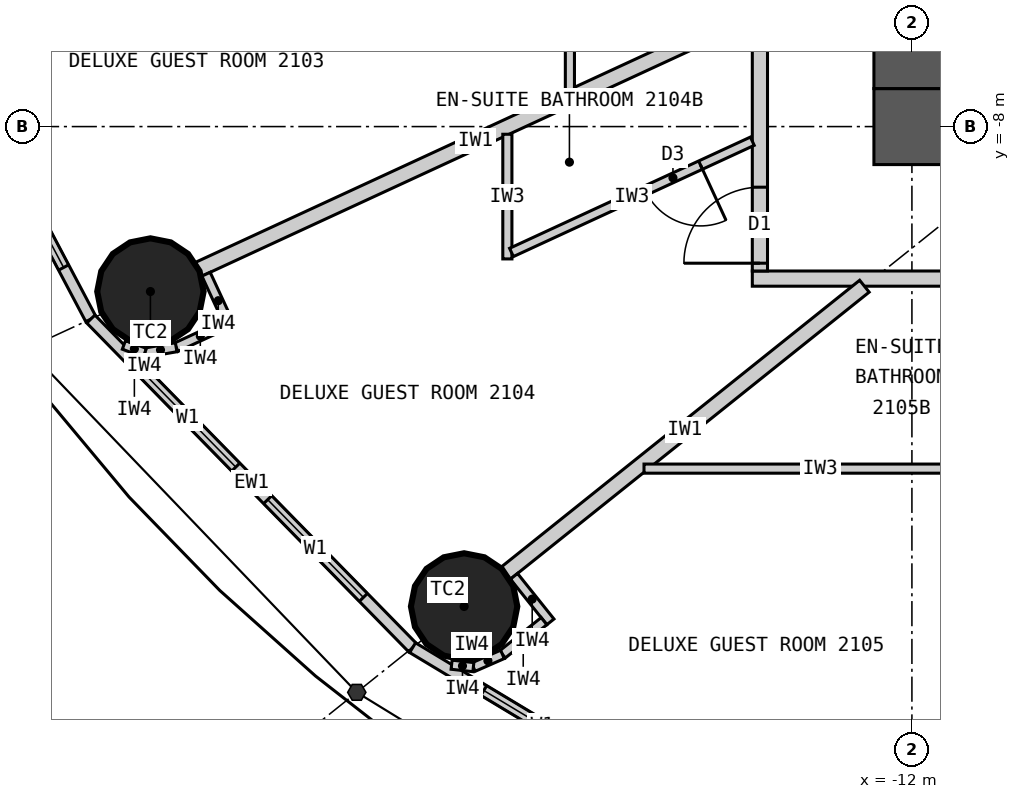
"""IFC4 building model, lengths in metres.
Left out: names, types, materials, properties, quantities, classifications, styles, units other than length and angle.
Written with IfcOpenShell. Run it as: python <this file> out.ifc"""

import sys

from ifc_helpers import new_model, si_unit, direction, frame, frame_2d, origin, origin_2d, place, context, subcontext, project, spatial, rectangle, circle, extrude, element, fill, save


model = new_model("IFC4")
c1 = context("Model", 3, precision=1e-05, world=origin(), true_north=direction((0.0, 1.0)))
c2 = subcontext(c1, "Body", "Model", "MODEL_VIEW")
j1 = project(units=[si_unit("LENGTHUNIT", "METRE"), si_unit("PLANEANGLEUNIT", "RADIAN")], contexts=[c1])
p1 = place(None, origin())
s1 = spatial("IfcSite", under=j1, at=p1, CompositionType="ELEMENT")
p2 = place(p1, origin())
s2 = spatial("IfcBuilding", under=s1, at=p2, CompositionType="ELEMENT")
p3 = place(p2, frame((0.0, 0.0, 83.7)))
s3 = spatial("IfcBuildingStorey", under=s2, at=p3, CompositionType="ELEMENT", Elevation=83.7)
for number, where, z_axis, x_axis in (
    (1, (-22.019, -10.17, 0.0), (0.0, 0.0, 1.0), (1.0, 0.0, 0.0)),
    (2, (-17.892, -14.313, 0.0), (0.0, 0.0, 1.0), (1.0, 0.0, 0.0)),
):
    element("IfcColumn", number, at=place(p3, frame(where, z_axis=z_axis, x_axis=x_axis)), inside=s3, PredefinedType="COLUMN", context=c2, shape_type="SweptSolid", body=[
        extrude(circle(Radius=0.7, at=origin_2d()), origin(), (0.0, 0.0, 1.0), 3.3),
    ])
p4 = place(p3, frame((12.5, -8.0, 0.0), z_axis=(0.0, 0.0, 1.0), x_axis=(-1.0, 0.0, 0.0)))
e3 = element("IfcWall", 3, at=p4, inside=s3, PredefinedType="SHEAR", context=c2, shape_type="SweptSolid", body=[
    extrude(rectangle(XDim=25.0, YDim=1.0, at=frame_2d((12.5, 0.0))), origin(), (0.0, 0.0, 1.0), 3.3),
])
p5 = place(p4, frame((11.2, 0.0, 0.0)))
e4 = element("IfcOpeningElement", 4, at=p5, cuts=e3, PredefinedType="OPENING", context=c2, shape_type="SweptSolid", body=[
    extrude(rectangle(XDim=1.2, YDim=2.2, at=frame_2d((0.6, 1.1))), frame((0.0, 0.51, 0.0), z_axis=(0.0, -1.0, 0.0), x_axis=(1.0, 0.0, 0.0)), (0.0, 0.0, 1.0), 1.02),
])
p6 = place(p4, frame((18.8, 0.0, 0.0)))
e5 = element("IfcOpeningElement", 5, at=p6, cuts=e3, PredefinedType="OPENING", context=c2, shape_type="SweptSolid", body=[
    extrude(rectangle(XDim=0.9, YDim=2.2, at=frame_2d((0.45, 1.1))), frame((0.0, 0.51, 0.0), z_axis=(0.0, -1.0, 0.0), x_axis=(1.0, 0.0, 0.0)), (0.0, 0.0, 1.0), 1.02),
])
p7 = place(p3, frame((-12.0, 7.5, 0.0), z_axis=(0.0, 0.0, 1.0), x_axis=(0.0, -1.0, 0.0)))
e6 = element("IfcWall", 6, at=p7, inside=s3, PredefinedType="SHEAR", context=c2, shape_type="SweptSolid", body=[
    extrude(rectangle(XDim=15.0, YDim=1.0, at=frame_2d((7.5, 0.0))), origin(), (0.0, 0.0, 1.0), 3.3),
])
p8 = place(p7, frame((6.6, 0.0, 0.0)))
e7 = element("IfcOpeningElement", 7, at=p8, cuts=e6, PredefinedType="OPENING", context=c2, shape_type="SweptSolid", body=[
    extrude(rectangle(XDim=1.8, YDim=2.2, at=frame_2d((0.9, 1.1))), frame((0.0, 0.51, 0.0), z_axis=(0.0, -1.0, 0.0), x_axis=(1.0, 0.0, 0.0)), (0.0, 0.0, 1.0), 1.02),
])
p9 = place(p3, frame((-25.482, -5.462, 0.0), z_axis=(0.0, 0.0, 1.0), x_axis=(0.467296867008, -0.884100468321, 0.0)))
e8 = element("IfcWall", 8, at=p9, inside=s3, PredefinedType="ELEMENTEDWALL", context=c2, shape_type="SweptSolid", body=[
    extrude(rectangle(XDim=5.734, YDim=0.15, at=frame_2d((2.867, 0.0))), origin(), (0.0, 0.0, 1.0), 3.12),
])
p10 = place(p9, frame((0.767, 0.0, 0.9)))
e9 = element("IfcOpeningElement", 9, at=p10, cuts=e8, PredefinedType="OPENING", context=c2, shape_type="SweptSolid", body=[
    extrude(rectangle(XDim=1.8, YDim=1.9, at=frame_2d((0.9, 0.95))), frame((0.0, 0.085, 0.0), z_axis=(0.0, -1.0, 0.0), x_axis=(1.0, 0.0, 0.0)), (0.0, 0.0, 1.0), 0.17),
])
p11 = place(p9, frame((3.167, 0.0, 0.9)))
e10 = element("IfcOpeningElement", 10, at=p11, cuts=e8, PredefinedType="OPENING", context=c2, shape_type="SweptSolid", body=[
    extrude(rectangle(XDim=1.8, YDim=1.9, at=frame_2d((0.9, 0.95))), frame((0.0, 0.085, 0.0), z_axis=(0.0, -1.0, 0.0), x_axis=(1.0, 0.0, 0.0)), (0.0, 0.0, 1.0), 0.17),
])
p12 = place(p3, frame((-22.803, -10.532, 0.0), z_axis=(0.0, 0.0, 1.0), x_axis=(0.699602905915, -0.714531856557, 0.0)))
e11 = element("IfcWall", 11, at=p12, inside=s3, PredefinedType="ELEMENTEDWALL", context=c2, shape_type="SweptSolid", body=[
    extrude(rectangle(XDim=6.051, YDim=0.15, at=frame_2d((3.025, 0.0))), origin(), (0.0, 0.0, 1.0), 3.12),
])
p13 = place(p12, frame((0.926, 0.0, 0.9)))
e12 = element("IfcOpeningElement", 12, at=p13, cuts=e11, PredefinedType="OPENING", context=c2, shape_type="SweptSolid", body=[
    extrude(rectangle(XDim=1.8, YDim=1.9, at=frame_2d((0.9, 0.95))), frame((0.0, 0.085, 0.0), z_axis=(0.0, -1.0, 0.0), x_axis=(1.0, 0.0, 0.0)), (0.0, 0.0, 1.0), 0.17),
])
p14 = place(p12, frame((3.325, 0.0, 0.9)))
e13 = element("IfcOpeningElement", 13, at=p14, cuts=e11, PredefinedType="OPENING", context=c2, shape_type="SweptSolid", body=[
    extrude(rectangle(XDim=1.8, YDim=1.9, at=frame_2d((0.9, 0.95))), frame((0.0, 0.085, 0.0), z_axis=(0.0, -1.0, 0.0), x_axis=(1.0, 0.0, 0.0)), (0.0, 0.0, 1.0), 0.17),
])
p15 = place(p3, frame((-18.57, -14.856, 0.0), z_axis=(0.0, 0.0, 1.0), x_axis=(0.856983180864, -0.515344377787, 0.0)))
e14 = element("IfcWall", 14, at=p15, inside=s3, PredefinedType="ELEMENTEDWALL", context=c2, shape_type="SweptSolid", body=[
    extrude(rectangle(XDim=6.386, YDim=0.15, at=frame_2d((3.193, 0.0))), origin(), (0.0, 0.0, 1.0), 3.12),
])
p16 = place(p15, frame((1.093, 0.0, 0.9)))
e15 = element("IfcOpeningElement", 15, at=p16, cuts=e14, PredefinedType="OPENING", context=c2, shape_type="SweptSolid", body=[
    extrude(rectangle(XDim=1.8, YDim=1.9, at=frame_2d((0.9, 0.95))), frame((0.0, 0.085, 0.0), z_axis=(0.0, -1.0, 0.0), x_axis=(1.0, 0.0, 0.0)), (0.0, 0.0, 1.0), 0.17),
])
p17 = place(p15, frame((3.493, 0.0, 0.9)))
e16 = element("IfcOpeningElement", 16, at=p17, cuts=e14, PredefinedType="OPENING", context=c2, shape_type="SweptSolid", body=[
    extrude(rectangle(XDim=1.8, YDim=1.9, at=frame_2d((0.9, 0.95))), frame((0.0, 0.085, 0.0), z_axis=(0.0, -1.0, 0.0), x_axis=(1.0, 0.0, 0.0)), (0.0, 0.0, 1.0), 0.17),
])
p18 = place(p3, frame((14.1, -10.0, 0.0), z_axis=(0.0, 0.0, 1.0), x_axis=(-1.0, 0.0, 0.0)))
e17 = element("IfcWall", 17, at=p18, inside=s3, PredefinedType="PARTITIONING", context=c2, shape_type="SweptSolid", body=[
    extrude(rectangle(XDim=28.2, YDim=0.2, at=frame_2d((14.1, 0.0))), origin(), (0.0, 0.0, 1.0), 3.12),
])
p19 = place(p18, frame((23.865, 0.0, 0.0)))
e18 = element("IfcOpeningElement", 18, at=p19, cuts=e17, PredefinedType="OPENING", context=c2, shape_type="SweptSolid", body=[
    extrude(rectangle(XDim=1.0, YDim=2.2, at=frame_2d((0.5, 1.1))), frame((0.0, 0.11, 0.0), z_axis=(0.0, -1.0, 0.0), x_axis=(1.0, 0.0, 0.0)), (0.0, 0.0, 1.0), 0.22),
])
p20 = place(p18, frame((18.529, 0.0, 0.0)))
e19 = element("IfcOpeningElement", 19, at=p20, cuts=e17, PredefinedType="OPENING", context=c2, shape_type="SweptSolid", body=[
    extrude(rectangle(XDim=1.0, YDim=2.2, at=frame_2d((0.5, 1.1))), frame((0.0, 0.11, 0.0), z_axis=(0.0, -1.0, 0.0), x_axis=(1.0, 0.0, 0.0)), (0.0, 0.0, 1.0), 0.22),
])
p21 = place(p18, frame((14.923, 0.0, 0.0)))
e20 = element("IfcOpeningElement", 20, at=p21, cuts=e17, PredefinedType="OPENING", context=c2, shape_type="SweptSolid", body=[
    extrude(rectangle(XDim=1.0, YDim=2.2, at=frame_2d((0.5, 1.1))), frame((0.0, 0.11, 0.0), z_axis=(0.0, -1.0, 0.0), x_axis=(1.0, 0.0, 0.0)), (0.0, 0.0, 1.0), 0.22),
])
p22 = place(p18, frame((2.801, 0.0, 0.0)))
e21 = element("IfcOpeningElement", 21, at=p22, cuts=e17, PredefinedType="OPENING", context=c2, shape_type="SweptSolid", body=[
    extrude(rectangle(XDim=1.0, YDim=2.2, at=frame_2d((0.5, 1.1))), frame((0.0, 0.11, 0.0), z_axis=(0.0, -1.0, 0.0), x_axis=(1.0, 0.0, 0.0)), (0.0, 0.0, 1.0), 0.22),
])
p23 = place(p3, frame((-14.0, 9.9, 0.0), z_axis=(0.0, 0.0, 1.0), x_axis=(0.0, -1.0, 0.0)))
e22 = element("IfcWall", 22, at=p23, inside=s3, PredefinedType="PARTITIONING", context=c2, shape_type="SweptSolid", body=[
    extrude(rectangle(XDim=19.8, YDim=0.2, at=frame_2d((9.9, 0.0))), origin(), (0.0, 0.0, 1.0), 3.12),
])
p24 = place(p23, frame((7.097, 0.0, 0.0)))
e23 = element("IfcOpeningElement", 23, at=p24, cuts=e22, PredefinedType="OPENING", context=c2, shape_type="SweptSolid", body=[
    extrude(rectangle(XDim=1.0, YDim=2.2, at=frame_2d((0.5, 1.1))), frame((0.0, 0.11, 0.0), z_axis=(0.0, -1.0, 0.0), x_axis=(1.0, 0.0, 0.0)), (0.0, 0.0, 1.0), 0.22),
])
p25 = place(p23, frame((10.778, 0.0, 0.0)))
e24 = element("IfcOpeningElement", 24, at=p25, cuts=e22, PredefinedType="OPENING", context=c2, shape_type="SweptSolid", body=[
    extrude(rectangle(XDim=1.0, YDim=2.2, at=frame_2d((0.5, 1.1))), frame((0.0, 0.11, 0.0), z_axis=(0.0, -1.0, 0.0), x_axis=(1.0, 0.0, 0.0)), (0.0, 0.0, 1.0), 0.22),
])
p26 = place(p23, frame((13.552, 0.0, 0.0)))
e25 = element("IfcOpeningElement", 25, at=p26, cuts=e22, PredefinedType="OPENING", context=c2, shape_type="SweptSolid", body=[
    extrude(rectangle(XDim=1.0, YDim=2.2, at=frame_2d((0.5, 1.1))), frame((0.0, 0.11, 0.0), z_axis=(0.0, -1.0, 0.0), x_axis=(1.0, 0.0, 0.0)), (0.0, 0.0, 1.0), 0.22),
])
p27 = place(p23, frame((18.698, 0.0, 0.0)))
e26 = element("IfcOpeningElement", 26, at=p27, cuts=e22, PredefinedType="OPENING", context=c2, shape_type="SweptSolid", body=[
    extrude(rectangle(XDim=1.0, YDim=2.2, at=frame_2d((0.5, 1.1))), frame((0.0, 0.11, 0.0), z_axis=(0.0, -1.0, 0.0), x_axis=(1.0, 0.0, 0.0)), (0.0, 0.0, 1.0), 0.22),
])
p28 = place(p23, frame((1.877, 0.0, 0.0)))
e27 = element("IfcOpeningElement", 27, at=p28, cuts=e22, PredefinedType="OPENING", context=c2, shape_type="SweptSolid", body=[
    extrude(rectangle(XDim=1.0, YDim=2.2, at=frame_2d((0.5, 1.1))), frame((0.0, 0.11, 0.0), z_axis=(0.0, -1.0, 0.0), x_axis=(1.0, 0.0, 0.0)), (0.0, 0.0, 1.0), 0.22),
])
p29 = place(p3, frame((-14.1, -6.512, 0.0), z_axis=(0.0, 0.0, 1.0), x_axis=(-0.907832871056, -0.419332181247, 0.0)))
e28 = element("IfcWall", 28, at=p29, inside=s3, PredefinedType="PARTITIONING", context=c2, shape_type="SweptSolid", body=[
    extrude(rectangle(XDim=8.023, YDim=0.2, at=frame_2d((4.011, 0.0))), origin(), (0.0, 0.0, 1.0), 2.32),
])
p30 = place(p3, frame((-12.625, -10.1, 0.0), z_axis=(0.0, 0.0, 1.0), x_axis=(-0.780892451574, -0.624665493744, 0.0)))
e29 = element("IfcWall", 29, at=p30, inside=s3, PredefinedType="PARTITIONING", context=c2, shape_type="SweptSolid", body=[
    extrude(rectangle(XDim=6.045, YDim=0.2, at=frame_2d((3.022, 0.0))), origin(), (0.0, 0.0, 1.0), 2.32),
])
p31 = place(p3, frame((-7.289, -10.1, 0.0), z_axis=(0.0, 0.0, 1.0), x_axis=(-0.585198353053, -0.810890182197, 0.0)))
e30 = element("IfcWall", 30, at=p31, inside=s3, PredefinedType="PARTITIONING", context=c2, shape_type="SweptSolid", body=[
    extrude(rectangle(XDim=8.36, YDim=0.2, at=frame_2d((4.18, 0.0))), origin(), (0.0, 0.0, 1.0), 2.32),
])
p32 = place(p3, frame((-16.5, -7.521, 0.0), z_axis=(0.0, 0.0, 1.0), x_axis=(0.0, 1.0, 0.0)))
e31 = element("IfcWall", 31, at=p32, inside=s3, PredefinedType="PARTITIONING", context=c2, shape_type="SweptSolid", body=[
    extrude(rectangle(XDim=2.749, YDim=0.12, at=frame_2d((1.374, 0.0))), origin(), (0.0, 0.0, 1.0), 3.12),
])
p33 = place(p3, frame((-17.323, -8.101, 0.0), z_axis=(0.0, 0.0, 1.0), x_axis=(0.0, -1.0, 0.0)))
e32 = element("IfcWall", 32, at=p33, inside=s3, PredefinedType="PARTITIONING", context=c2, shape_type="SweptSolid", body=[
    extrude(rectangle(XDim=1.64, YDim=0.12, at=frame_2d((0.82, 0.0))), origin(), (0.0, 0.0, 1.0), 3.12),
])
p34 = place(p3, frame((-14.1, -8.193, 0.0), z_axis=(0.0, 0.0, 1.0), x_axis=(-0.907836493557, -0.419324338628, 0.0)))
e33 = element("IfcWall", 33, at=p34, inside=s3, PredefinedType="PARTITIONING", context=c2, shape_type="SweptSolid", body=[
    extrude(rectangle(XDim=3.49, YDim=0.12, at=frame_2d((1.745, 0.0))), origin(), (0.0, 0.0, 1.0), 3.12),
])
p35 = place(p34, frame((0.75, 0.0, 0.0)))
e34 = element("IfcOpeningElement", 34, at=p35, cuts=e33, PredefinedType="OPENING", context=c2, shape_type="SweptSolid", body=[
    extrude(rectangle(XDim=0.8, YDim=2.1, at=frame_2d((0.4, 1.05))), frame((0.0, 0.07, 0.0), z_axis=(0.0, -1.0, 0.0), x_axis=(1.0, 0.0, 0.0)), (0.0, 0.0, 1.0), 0.14),
])
p36 = place(p3, frame((-15.525, -12.5, 0.0), z_axis=(0.0, 0.0, 1.0), x_axis=(1.0, 0.0, 0.0)))
e35 = element("IfcWall", 35, at=p36, inside=s3, PredefinedType="PARTITIONING", context=c2, shape_type="SweptSolid", body=[
    extrude(rectangle(XDim=4.64, YDim=0.12, at=frame_2d((2.32, 0.0))), origin(), (0.0, 0.0, 1.0), 3.12),
])
p37 = place(p3, frame((-21.287, -9.942, 0.0), z_axis=(0.0, 0.0, 1.0), x_axis=(0.419259891039, -0.907866258744, 0.0)))
e36 = element("IfcWall", 36, at=p37, inside=s3, PredefinedType="PARTITIONING", context=c2, shape_type="SweptSolid", body=[
    extrude(rectangle(XDim=0.768, YDim=0.12, at=frame_2d((0.384, 0.0))), origin(), (0.0, 0.0, 1.0), 3.12),
])
p38 = place(p3, frame((-21.045, -10.61, 0.0), z_axis=(0.0, 0.0, 1.0), x_axis=(-0.907877701396, -0.419235112208, 0.0)))
e37 = element("IfcWall", 37, at=p38, inside=s3, PredefinedType="PARTITIONING", context=c2, shape_type="SweptSolid", body=[
    extrude(rectangle(XDim=0.7, YDim=0.12, at=frame_2d((0.35, 0.0))), origin(), (0.0, 0.0, 1.0), 3.12),
])
p39 = place(p3, frame((-21.68, -10.903, 0.0), z_axis=(0.0, 0.0, 1.0), x_axis=(-0.985446622073, -0.169985161247, 0.0)))
e38 = element("IfcWall", 38, at=p39, inside=s3, PredefinedType="PARTITIONING", context=c2, shape_type="SweptSolid", body=[
    extrude(rectangle(XDim=0.418, YDim=0.12, at=frame_2d((0.209, 0.0))), origin(), (0.0, 0.0, 1.0), 3.12),
])
p40 = place(p3, frame((-22.092, -10.974, 0.0), z_axis=(0.0, 0.0, 1.0), x_axis=(-0.938428160676, 0.345474437912, 0.0)))
e39 = element("IfcWall", 39, at=p40, inside=s3, PredefinedType="PARTITIONING", context=c2, shape_type="SweptSolid", body=[
    extrude(rectangle(XDim=0.294, YDim=0.12, at=frame_2d((0.147, 0.0))), origin(), (0.0, 0.0, 1.0), 3.12),
])
p41 = place(p3, frame((-17.236, -13.917, 0.0), z_axis=(0.0, 0.0, 1.0), x_axis=(0.624695047554, -0.780868809443, 0.0)))
e40 = element("IfcWall", 40, at=p41, inside=s3, PredefinedType="PARTITIONING", context=c2, shape_type="SweptSolid", body=[
    extrude(rectangle(XDim=0.768, YDim=0.12, at=frame_2d((0.384, 0.0))), origin(), (0.0, 0.0, 1.0), 3.12),
])
p42 = place(p3, frame((-16.841, -14.507, 0.0), z_axis=(0.0, 0.0, 1.0), x_axis=(-0.780902834923, -0.62465251333, 0.0)))
e41 = element("IfcWall", 41, at=p42, inside=s3, PredefinedType="PARTITIONING", context=c2, shape_type="SweptSolid", body=[
    extrude(rectangle(XDim=0.7, YDim=0.12, at=frame_2d((0.35, 0.0))), origin(), (0.0, 0.0, 1.0), 3.12),
])
p43 = place(p3, frame((-17.387, -14.944, 0.0), z_axis=(0.0, 0.0, 1.0), x_axis=(-0.916036698064, -0.401094462441, 0.0)))
e42 = element("IfcWall", 42, at=p43, inside=s3, PredefinedType="PARTITIONING", context=c2, shape_type="SweptSolid", body=[
    extrude(rectangle(XDim=0.418, YDim=0.12, at=frame_2d((0.209, 0.0))), origin(), (0.0, 0.0, 1.0), 3.12),
])
p44 = place(p3, frame((-17.77, -15.112, 0.0), z_axis=(0.0, 0.0, 1.0), x_axis=(-0.993904401174, 0.110245368731, 0.0)))
e43 = element("IfcWall", 43, at=p44, inside=s3, PredefinedType="PARTITIONING", context=c2, shape_type="SweptSolid", body=[
    extrude(rectangle(XDim=0.288, YDim=0.12, at=frame_2d((0.144, 0.0))), origin(), (0.0, 0.0, 1.0), 3.12),
])
p45 = place(p11, origin())
e44 = element("IfcWindow", 44, at=p45, inside=s3, PartitioningType="SINGLE_PANEL", PredefinedType="WINDOW", context=c2, shape_type="SweptSolid", body=[
    extrude(rectangle(XDim=1.8, YDim=1.9, at=frame_2d((0.9, 0.95))), frame((0.0, 0.03, 0.0), z_axis=(0.0, -1.0, 0.0), x_axis=(1.0, 0.0, 0.0)), (0.0, 0.0, 1.0), 0.06),
])
fill(e10, e44)
p46 = place(p13, origin())
e45 = element("IfcWindow", 45, at=p46, inside=s3, PartitioningType="SINGLE_PANEL", PredefinedType="WINDOW", context=c2, shape_type="SweptSolid", body=[
    extrude(rectangle(XDim=1.8, YDim=1.9, at=frame_2d((0.9, 0.95))), frame((0.0, 0.03, 0.0), z_axis=(0.0, -1.0, 0.0), x_axis=(1.0, 0.0, 0.0)), (0.0, 0.0, 1.0), 0.06),
])
fill(e12, e45)
p47 = place(p14, origin())
e46 = element("IfcWindow", 46, at=p47, inside=s3, PartitioningType="SINGLE_PANEL", PredefinedType="WINDOW", context=c2, shape_type="SweptSolid", body=[
    extrude(rectangle(XDim=1.8, YDim=1.9, at=frame_2d((0.9, 0.95))), frame((0.0, 0.03, 0.0), z_axis=(0.0, -1.0, 0.0), x_axis=(1.0, 0.0, 0.0)), (0.0, 0.0, 1.0), 0.06),
])
fill(e13, e46)
p48 = place(p16, origin())
e47 = element("IfcWindow", 47, at=p48, inside=s3, PartitioningType="SINGLE_PANEL", PredefinedType="WINDOW", context=c2, shape_type="SweptSolid", body=[
    extrude(rectangle(XDim=1.8, YDim=1.9, at=frame_2d((0.9, 0.95))), frame((0.0, 0.03, 0.0), z_axis=(0.0, -1.0, 0.0), x_axis=(1.0, 0.0, 0.0)), (0.0, 0.0, 1.0), 0.06),
])
fill(e15, e47)
p49 = place(p35, origin())
e48 = element("IfcDoor", 48, at=p49, inside=s3, OperationType="SINGLE_SWING_LEFT", PredefinedType="DOOR", context=c2, shape_type="SweptSolid", body=[
    extrude(rectangle(XDim=0.8, YDim=2.1, at=frame_2d((0.4, 1.05))), frame((0.0, 0.025, 0.0), z_axis=(0.0, -1.0, 0.0), x_axis=(1.0, 0.0, 0.0)), (0.0, 0.0, 1.0), 0.05),
])
fill(e34, e48)
p50 = place(p27, origin())
e49 = element("IfcDoor", 49, at=p50, inside=s3, OperationType="SINGLE_SWING_RIGHT", PredefinedType="DOOR", context=c2, shape_type="SweptSolid", body=[
    extrude(rectangle(XDim=1.0, YDim=2.2, at=frame_2d((0.5, 1.1))), frame((0.0, 0.025, 0.0), z_axis=(0.0, -1.0, 0.0), x_axis=(1.0, 0.0, 0.0)), (0.0, 0.0, 1.0), 0.05),
])
fill(e26, e49)
save(model, sys.argv[1])
